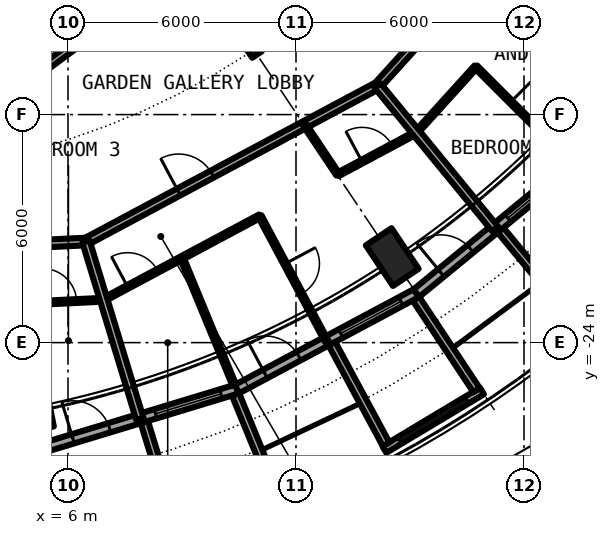
"""IFC4 building model, lengths in metres.
Left out: names, types, materials, properties, quantities, classifications, styles, units other than length and angle.
Written with IfcOpenShell. Run it as: python <this file> out.ifc"""

import sys

from ifc_helpers import new_model, si_unit, direction, frame, frame_2d, origin, origin_2d, place, context, subcontext, project, spatial, rectangle, circle, hollow_circle, i_section, extrude, element, fill, save


model = new_model("IFC4")
c1 = context("Model", 3, precision=1e-05, world=origin(), true_north=direction((0.0, 1.0)))
c2 = subcontext(c1, "Body", "Model", "MODEL_VIEW")
j1 = project(units=[si_unit("LENGTHUNIT", "METRE"), si_unit("PLANEANGLEUNIT", "RADIAN")], contexts=[c1])
p1 = place(None, origin())
s1 = spatial("IfcSite", under=j1, at=p1, CompositionType="ELEMENT")
p2 = place(p1, origin())
s2 = spatial("IfcBuilding", under=s1, at=p2, CompositionType="ELEMENT")
p3 = place(p2, frame((0.0, 0.0, 234.05)))
s3 = spatial("IfcBuildingStorey", under=s2, at=p3, CompositionType="ELEMENT", Elevation=234.05)
p4 = place(p3, frame((5.229, -26.285, 0.0), z_axis=(-0.081382632414, 0.409131968018, 0.908838764516), x_axis=(-0.980784718923, -0.195093144748, 0.0)))
e1 = element("IfcColumn", 1, at=p4, inside=s3, PredefinedType="COLUMN", context=c2, shape_type="SweptSolid", body=[
    extrude(hollow_circle(Radius=0.406, WallThickness=0.03, at=origin_2d()), origin(), (0.0, 0.0, 1.0), 3.081),
])
p5 = place(p3, frame((14.889, -22.283, 0.0), z_axis=(-0.231777820067, 0.346913947437, 0.908806775502), x_axis=(-0.831494710184, -0.555532669549, 0.0)))
e2 = element("IfcColumn", 2, at=p5, inside=s3, PredefinedType="COLUMN", context=c2, shape_type="SweptSolid", body=[
    extrude(hollow_circle(Radius=0.406, WallThickness=0.03, at=origin_2d()), origin(), (0.0, 0.0, 1.0), 3.081),
])
p6 = place(p3, frame((10.889, -16.297, 0.0), z_axis=(0.0, 0.0, 1.0), x_axis=(0.55557023302, -0.831469612303, 0.0)))
e3 = element("IfcColumn", 3, at=p6, inside=s3, PredefinedType="COLUMN", context=c2, shape_type="SweptSolid", body=[
    extrude(i_section(OverallWidth=0.3, OverallDepth=0.3, WebThickness=0.011, FlangeThickness=0.019, FilletRadius=0.027, at=origin_2d()), origin(), (0.0, 0.0, 1.0), 3.05),
])
p7 = place(p3, frame((5.261, -26.907, -0.03), z_axis=(0.0, 0.0, 1.0), x_axis=(0.191440729923, -0.981504175705, 0.0)))
e4 = element("IfcWall", 4, at=p7, inside=s3, PredefinedType="SOLIDWALL", context=c2, shape_type="SweptSolid", body=[
    extrude(rectangle(XDim=2.883, YDim=0.2, at=frame_2d((1.442, 0.0))), origin(), (0.0, 0.0, 1.0), 2.73),
])
p8 = place(p3, frame((5.326, -26.775, 0.0), z_axis=(0.0, 0.0, 1.0), x_axis=(0.956965678721, 0.290201119486, 0.0)))
e5 = element("IfcWall", 5, at=p8, inside=s3, PredefinedType="SOLIDWALL", context=c2, shape_type="SweptSolid", body=[
    extrude(rectangle(XDim=5.351, YDim=0.25, at=frame_2d((2.676, 0.0))), origin(), (0.0, 0.0, 1.0), 2.7),
])
p9 = place(p8, frame((0.841, 0.0, 0.0)))
e6 = element("IfcOpeningElement", 6, at=p9, cuts=e5, PredefinedType="OPENING", context=c2, shape_type="SweptSolid", body=[
    extrude(rectangle(XDim=1.0, YDim=2.2, at=frame_2d((0.5, 1.1))), frame((0.0, 0.135, 0.0), z_axis=(0.0, -1.0, 0.0), x_axis=(1.0, 0.0, 0.0)), (0.0, 0.0, 1.0), 0.27),
])
p10 = place(p8, frame((3.111, 0.0, 0.3)))
e7 = element("IfcOpeningElement", 7, at=p10, cuts=e5, PredefinedType="OPENING", context=c2, shape_type="SweptSolid", body=[
    extrude(rectangle(XDim=1.8, YDim=2.1, at=frame_2d((0.9, 1.05))), frame((0.0, 0.135, 0.0), z_axis=(0.0, -1.0, 0.0), x_axis=(1.0, 0.0, 0.0)), (0.0, 0.0, 1.0), 0.27),
])
p11 = place(p3, frame((8.009, -26.092, -0.03), z_axis=(0.0, 0.0, 1.0), x_axis=(0.293406695073, -0.955987715029, 0.0)))
e8 = element("IfcWall", 8, at=p11, inside=s3, PredefinedType="SOLIDWALL", context=c2, shape_type="SweptSolid", body=[
    extrude(rectangle(XDim=3.006, YDim=0.2, at=frame_2d((1.503, 0.0))), origin(), (0.0, 0.0, 1.0), 2.73),
])
p12 = place(p3, frame((10.409, -25.364, -0.03), z_axis=(0.0, 0.0, 1.0), x_axis=(0.379509886562, -0.925187681501, 0.0)))
e9 = element("IfcWall", 9, at=p12, inside=s3, PredefinedType="SOLIDWALL", context=c2, shape_type="SweptSolid", body=[
    extrude(rectangle(XDim=2.883, YDim=0.2, at=frame_2d((1.441, 0.0))), origin(), (0.0, 0.0, 1.0), 2.73),
])
p13 = place(p3, frame((10.447, -25.222, 0.0), z_axis=(0.0, 0.0, 1.0), x_axis=(0.881915646801, 0.471407246368, 0.0)))
e10 = element("IfcWall", 10, at=p13, inside=s3, PredefinedType="SOLIDWALL", context=c2, shape_type="SweptSolid", body=[
    extrude(rectangle(XDim=5.352, YDim=0.25, at=frame_2d((2.676, 0.0))), origin(), (0.0, 0.0, 1.0), 2.7),
])
p14 = place(p13, frame((0.841, 0.0, 0.0)))
e11 = element("IfcOpeningElement", 11, at=p14, cuts=e10, PredefinedType="OPENING", context=c2, shape_type="SweptSolid", body=[
    extrude(rectangle(XDim=1.0, YDim=2.2, at=frame_2d((0.5, 1.1))), frame((0.0, 0.135, 0.0), z_axis=(0.0, -1.0, 0.0), x_axis=(1.0, 0.0, 0.0)), (0.0, 0.0, 1.0), 0.27),
])
p15 = place(p13, frame((3.096, 0.0, 0.3)))
e12 = element("IfcOpeningElement", 12, at=p15, cuts=e10, PredefinedType="OPENING", context=c2, shape_type="SweptSolid", body=[
    extrude(rectangle(XDim=1.8, YDim=2.1, at=frame_2d((0.9, 1.05))), frame((0.0, 0.135, 0.0), z_axis=(0.0, -1.0, 0.0), x_axis=(1.0, 0.0, 0.0)), (0.0, 0.0, 1.0), 0.27),
])
p16 = place(p3, frame((14.326, -26.813, -0.03), z_axis=(0.0, 0.0, 1.0), x_axis=(0.857672799601, 0.51419584676, 0.0)))
e13 = element("IfcWall", 13, at=p16, inside=s3, PredefinedType="SOLIDWALL", context=c2, shape_type="SweptSolid", body=[
    extrude(rectangle(XDim=2.993, YDim=0.2, at=frame_2d((1.497, 0.0))), origin(), (0.0, 0.0, 1.0), 2.73),
])
p17 = place(p16, frame((0.457, 0.0, 0.33)))
e14 = element("IfcOpeningElement", 14, at=p17, cuts=e13, PredefinedType="OPENING", context=c2, shape_type="SweptSolid", body=[
    extrude(circle(Radius=1.04, at=frame_2d((1.04, 1.04))), frame((0.0, 0.11, 0.0), z_axis=(0.0, -1.0, 0.0), x_axis=(1.0, 0.0, 0.0)), (0.0, 0.0, 1.0), 0.22),
])
p18 = place(p3, frame((12.945, -24.029, -0.03), z_axis=(0.0, 0.0, 1.0), x_axis=(0.474424310775, -0.88029629861, 0.0)))
e15 = element("IfcWall", 15, at=p18, inside=s3, PredefinedType="SOLIDWALL", context=c2, shape_type="SweptSolid", body=[
    extrude(rectangle(XDim=3.006, YDim=0.2, at=frame_2d((1.503, 0.0))), origin(), (0.0, 0.0, 1.0), 2.73),
])
p19 = place(p3, frame((15.157, -22.846, -0.03), z_axis=(0.0, 0.0, 1.0), x_axis=(0.552529231086, -0.833493520548, 0.0)))
e16 = element("IfcWall", 16, at=p19, inside=s3, PredefinedType="SOLIDWALL", context=c2, shape_type="SweptSolid", body=[
    extrude(rectangle(XDim=2.883, YDim=0.2, at=frame_2d((1.441, 0.0))), origin(), (0.0, 0.0, 1.0), 2.73),
])
p20 = place(p3, frame((15.167, -22.699, 0.0), z_axis=(0.0, 0.0, 1.0), x_axis=(0.773019449054, 0.634382322723, 0.0)))
e17 = element("IfcWall", 17, at=p20, inside=s3, PredefinedType="SOLIDWALL", context=c2, shape_type="SweptSolid", body=[
    extrude(rectangle(XDim=5.352, YDim=0.25, at=frame_2d((2.676, 0.0))), origin(), (0.0, 0.0, 1.0), 2.7),
])
p21 = place(p20, frame((0.841, 0.0, 0.0)))
e18 = element("IfcOpeningElement", 18, at=p21, cuts=e17, PredefinedType="OPENING", context=c2, shape_type="SweptSolid", body=[
    extrude(rectangle(XDim=1.0, YDim=2.2, at=frame_2d((0.5, 1.1))), frame((0.0, 0.135, 0.0), z_axis=(0.0, -1.0, 0.0), x_axis=(1.0, 0.0, 0.0)), (0.0, 0.0, 1.0), 0.27),
])
p22 = place(p20, frame((3.111, 0.0, 0.3)))
e19 = element("IfcOpeningElement", 19, at=p22, cuts=e17, PredefinedType="OPENING", context=c2, shape_type="SweptSolid", body=[
    extrude(rectangle(XDim=1.8, YDim=2.1, at=frame_2d((0.9, 1.05))), frame((0.0, 0.135, 0.0), z_axis=(0.0, -1.0, 0.0), x_axis=(1.0, 0.0, 0.0)), (0.0, 0.0, 1.0), 0.27),
])
p23 = place(p3, frame((17.384, -21.041, -0.03), z_axis=(0.0, 0.0, 1.0), x_axis=(0.63709551667, -0.770784861449, 0.0)))
e20 = element("IfcWall", 20, at=p23, inside=s3, PredefinedType="SOLIDWALL", context=c2, shape_type="SweptSolid", body=[
    extrude(rectangle(XDim=3.006, YDim=0.2, at=frame_2d((1.503, 0.0))), origin(), (0.0, 0.0, 1.0), 2.73),
])
p24 = place(p3, frame((15.162, -18.475, 0.0), z_axis=(0.0, 0.0, 1.0), x_axis=(0.671528384412, 0.740978831634, 0.0)))
e21 = element("IfcWall", 21, at=p24, inside=s3, PredefinedType="PARTITIONING", context=c2, shape_type="SweptSolid", body=[
    extrude(rectangle(XDim=2.338, YDim=0.1, at=frame_2d((1.169, 0.0))), origin(), (0.0, 0.0, 1.0), 2.7),
])
p25 = place(p3, frame((6.938, -22.871, 0.0), z_axis=(0.0, 0.0, 1.0), x_axis=(0.881916280728, 0.471406060405, 0.0)))
e22 = element("IfcWall", 22, at=p25, inside=s3, PredefinedType="PARTITIONING", context=c2, shape_type="SweptSolid", body=[
    extrude(rectangle(XDim=4.663, YDim=0.1, at=frame_2d((2.331, 0.0))), origin(), (0.0, 0.0, 1.0), 2.7),
])
p26 = place(p25, frame((0.716, 0.0, 0.0)))
e23 = element("IfcOpeningElement", 23, at=p26, cuts=e22, PredefinedType="OPENING", context=c2, shape_type="SweptSolid", body=[
    extrude(rectangle(XDim=0.9, YDim=2.3, at=frame_2d((0.45, 1.15))), frame((0.0, 0.06, 0.0), z_axis=(0.0, -1.0, 0.0), x_axis=(1.0, 0.0, 0.0)), (0.0, 0.0, 1.0), 0.12),
])
p27 = place(p3, frame((13.106, -19.574, 0.0), z_axis=(0.0, 0.0, 1.0), x_axis=(0.881949682246, 0.471343566824, 0.0)))
e24 = element("IfcWall", 24, at=p27, inside=s3, PredefinedType="PARTITIONING", context=c2, shape_type="SweptSolid", body=[
    extrude(rectangle(XDim=2.331, YDim=0.1, at=frame_2d((1.166, 0.0))), origin(), (0.0, 0.0, 1.0), 2.7),
])
p28 = place(p27, frame((0.716, 0.0, 0.0)))
e25 = element("IfcOpeningElement", 25, at=p28, cuts=e24, PredefinedType="OPENING", context=c2, shape_type="SweptSolid", body=[
    extrude(rectangle(XDim=0.9, YDim=2.3, at=frame_2d((0.45, 1.15))), frame((0.0, 0.06, 0.0), z_axis=(0.0, -1.0, 0.0), x_axis=(1.0, 0.0, 0.0)), (0.0, 0.0, 1.0), 0.12),
])
p29 = place(p3, frame((-0.022, -23.213, 0.0), z_axis=(0.0, 0.0, 1.0), x_axis=(0.998796328708, 0.049049910909, 0.0)))
e26 = element("IfcWall", 26, at=p29, inside=s3, PredefinedType="PARTITIONING", context=c2, shape_type="SweptSolid", body=[
    extrude(rectangle(XDim=6.968, YDim=0.1, at=frame_2d((3.484, 0.0))), origin(), (0.0, 0.0, 1.0), 2.7),
])
p30 = place(p29, frame((3.034, 0.0, 0.0)))
e27 = element("IfcOpeningElement", 27, at=p30, cuts=e26, PredefinedType="OPENING", context=c2, shape_type="SweptSolid", body=[
    extrude(rectangle(XDim=0.9, YDim=2.3, at=frame_2d((0.45, 1.15))), frame((0.0, 0.06, 0.0), z_axis=(0.0, -1.0, 0.0), x_axis=(1.0, 0.0, 0.0)), (0.0, 0.0, 1.0), 0.12),
])
p31 = place(p29, frame((5.357, 0.0, 0.0)))
e28 = element("IfcOpeningElement", 28, at=p31, cuts=e26, PredefinedType="OPENING", context=c2, shape_type="SweptSolid", body=[
    extrude(rectangle(XDim=0.9, YDim=2.3, at=frame_2d((0.45, 1.15))), frame((0.0, 0.06, 0.0), z_axis=(0.0, -1.0, 0.0), x_axis=(1.0, 0.0, 0.0)), (0.0, 0.0, 1.0), 0.12),
])
p32 = place(p3, frame((14.147, -17.238, 0.0), z_axis=(0.0, 0.0, 1.0), x_axis=(0.671561669125, 0.740948665268, 0.0)))
e29 = element("IfcWall", 29, at=p32, inside=s3, PredefinedType="PARTITIONING", context=c2, shape_type="SweptSolid", body=[
    extrude(rectangle(XDim=6.544, YDim=0.2, at=frame_2d((3.272, 0.0))), origin(), (0.0, 0.0, 1.0), 2.7),
])
p33 = place(p32, frame((1.682, 0.0, 0.0)))
e30 = element("IfcOpeningElement", 30, at=p33, cuts=e29, PredefinedType="OPENING", context=c2, shape_type="SweptSolid", body=[
    extrude(rectangle(XDim=1.0, YDim=2.3, at=frame_2d((0.5, 1.15))), frame((0.0, 0.11, 0.0), z_axis=(0.0, -1.0, 0.0), x_axis=(1.0, 0.0, 0.0)), (0.0, 0.0, 1.0), 0.22),
])
p34 = place(p3, frame((6.48, -21.339, 0.0), z_axis=(0.0, 0.0, 1.0), x_axis=(0.881794682218, 0.471633478892, 0.0)))
e31 = element("IfcWall", 31, at=p34, inside=s3, PredefinedType="PARTITIONING", context=c2, shape_type="SweptSolid", body=[
    extrude(rectangle(XDim=8.702, YDim=0.2, at=frame_2d((4.351, 0.0))), origin(), (0.0, 0.0, 1.0), 2.7),
])
p35 = place(p34, frame((2.758, 0.0, 0.0)))
e32 = element("IfcOpeningElement", 32, at=p35, cuts=e31, PredefinedType="OPENING", context=c2, shape_type="SweptSolid", body=[
    extrude(rectangle(XDim=1.0, YDim=2.3, at=frame_2d((0.5, 1.15))), frame((0.0, 0.11, 0.0), z_axis=(0.0, -1.0, 0.0), x_axis=(1.0, 0.0, 0.0)), (0.0, 0.0, 1.0), 0.22),
])
p36 = place(p3, frame((-4.358, -21.872, 0.0), z_axis=(0.0, 0.0, 1.0), x_axis=(0.998795913445, 0.049058366102, 0.0)))
e33 = element("IfcWall", 33, at=p36, inside=s3, PredefinedType="PARTITIONING", context=c2, shape_type="SweptSolid", body=[
    extrude(rectangle(XDim=10.844, YDim=0.2, at=frame_2d((5.422, 0.0))), origin(), (0.0, 0.0, 1.0), 2.7),
])
p37 = place(p36, frame((6.009, 0.0, 0.0)))
e34 = element("IfcOpeningElement", 34, at=p37, cuts=e33, PredefinedType="OPENING", context=c2, shape_type="SweptSolid", body=[
    extrude(rectangle(XDim=1.0, YDim=2.3, at=frame_2d((0.5, 1.15))), frame((0.0, 0.11, 0.0), z_axis=(0.0, -1.0, 0.0), x_axis=(1.0, 0.0, 0.0)), (0.0, 0.0, 1.0), 0.22),
])
p38 = place(p3, frame((5.137, -16.938, 0.0), z_axis=(0.0, 0.0, 1.0), x_axis=(0.803229232922, 0.595670042371, 0.0)))
e35 = element("IfcWall", 35, at=p38, inside=s3, PredefinedType="PARTITIONING", context=c2, shape_type="SweptSolid", body=[
    extrude(rectangle(XDim=10.224, YDim=0.2, at=frame_2d((5.112, 0.0))), origin(), (0.0, 0.0, 1.0), 2.7),
])
p39 = place(p38, frame((4.612, 0.0, 0.0)))
e36 = element("IfcOpeningElement", 36, at=p39, cuts=e35, PredefinedType="OPENING", context=c2, shape_type="SweptSolid", body=[
    extrude(rectangle(XDim=1.0, YDim=2.3, at=frame_2d((0.5, 1.15))), frame((0.0, 0.11, 0.0), z_axis=(0.0, -1.0, 0.0), x_axis=(1.0, 0.0, 0.0)), (0.0, 0.0, 1.0), 0.22),
])
p40 = place(p3, frame((6.473, -21.34, 0.0), z_axis=(0.0, 0.0, 1.0), x_axis=(0.290705166682, -0.956812680761, 0.0)))
e37 = element("IfcWall", 37, at=p40, inside=s3, PredefinedType="PARTITIONING", context=c2, shape_type="SweptSolid", body=[
    extrude(rectangle(XDim=4.874, YDim=0.2, at=frame_2d((2.437, 0.0))), origin(), (0.0, 0.0, 1.0), 2.7),
])
p41 = place(p3, frame((8.994, -21.772, 0.0), z_axis=(0.0, 0.0, 1.0), x_axis=(0.381733837918, -0.924272295911, 0.0)))
e38 = element("IfcWall", 38, at=p41, inside=s3, PredefinedType="PARTITIONING", context=c2, shape_type="SweptSolid", body=[
    extrude(rectangle(XDim=3.618, YDim=0.1, at=frame_2d((1.809, 0.0))), origin(), (0.0, 0.0, 1.0), 2.7),
])
p42 = place(p3, frame((11.049, -20.674, 0.0), z_axis=(0.0, 0.0, 1.0), x_axis=(0.471372010014, -0.881934480659, 0.0)))
e39 = element("IfcWall", 39, at=p42, inside=s3, PredefinedType="PARTITIONING", context=c2, shape_type="SweptSolid", body=[
    extrude(rectangle(XDim=3.734, YDim=0.1, at=frame_2d((1.867, 0.0))), origin(), (0.0, 0.0, 1.0), 2.7),
])
p43 = place(p42, frame((1.417, 0.0, 0.0)))
e40 = element("IfcOpeningElement", 40, at=p43, cuts=e39, PredefinedType="OPENING", context=c2, shape_type="SweptSolid", body=[
    extrude(rectangle(XDim=0.9, YDim=2.3, at=frame_2d((0.45, 1.15))), frame((0.0, 0.06, 0.0), z_axis=(0.0, -1.0, 0.0), x_axis=(1.0, 0.0, 0.0)), (0.0, 0.0, 1.0), 0.12),
])
p44 = place(p3, frame((12.226, -18.266, 0.0), z_axis=(0.0, 0.0, 1.0), x_axis=(0.55634326631, -0.830952567859, 0.0)))
e41 = element("IfcWall", 41, at=p44, inside=s3, PredefinedType="PARTITIONING", context=c2, shape_type="SweptSolid", body=[
    extrude(rectangle(XDim=1.576, YDim=0.1, at=frame_2d((0.788, 0.0))), origin(), (0.0, 0.0, 1.0), 2.7),
])
p45 = place(p3, frame((14.147, -17.238, 0.0), z_axis=(0.0, 0.0, 1.0), x_axis=(0.634374159378, -0.773026148273, 0.0)))
e42 = element("IfcWall", 42, at=p45, inside=s3, PredefinedType="PARTITIONING", context=c2, shape_type="SweptSolid", body=[
    extrude(rectangle(XDim=4.876, YDim=0.2, at=frame_2d((2.438, 0.0))), origin(), (0.0, 0.0, 1.0), 2.7),
])
p46 = place(p3, frame((16.732, -16.743, 0.0), z_axis=(0.0, 0.0, 1.0), x_axis=(0.706967463531, -0.707246071398, 0.0)))
e43 = element("IfcWall", 43, at=p46, inside=s3, PredefinedType="PARTITIONING", context=c2, shape_type="SweptSolid", body=[
    extrude(rectangle(XDim=3.505, YDim=0.1, at=frame_2d((1.752, 0.0))), origin(), (0.0, 0.0, 1.0), 2.7),
])
p47 = place(p46, frame((1.303, 0.0, 0.0)))
e44 = element("IfcOpeningElement", 44, at=p47, cuts=e43, PredefinedType="OPENING", context=c2, shape_type="SweptSolid", body=[
    extrude(rectangle(XDim=0.9, YDim=2.3, at=frame_2d((0.45, 1.15))), frame((0.0, 0.06, 0.0), z_axis=(0.0, -1.0, 0.0), x_axis=(1.0, 0.0, 0.0)), (0.0, 0.0, 1.0), 0.12),
])
p48 = place(p9, origin())
e45 = element("IfcDoor", 45, at=p48, inside=s3, OperationType="SINGLE_SWING_LEFT", PredefinedType="DOOR", context=c2, shape_type="SweptSolid", body=[
    extrude(rectangle(XDim=1.0, YDim=2.2, at=frame_2d((0.5, 1.1))), frame((0.0, 0.025, 0.0), z_axis=(0.0, -1.0, 0.0), x_axis=(1.0, 0.0, 0.0)), (0.0, 0.0, 1.0), 0.05),
])
fill(e6, e45)
p49 = place(p10, origin())
e46 = element("IfcWindow", 46, at=p49, inside=s3, PartitioningType="SINGLE_PANEL", PredefinedType="WINDOW", context=c2, shape_type="SweptSolid", body=[
    extrude(rectangle(XDim=1.8, YDim=2.1, at=frame_2d((0.9, 1.05))), frame((0.0, 0.03, 0.0), z_axis=(0.0, -1.0, 0.0), x_axis=(1.0, 0.0, 0.0)), (0.0, 0.0, 1.0), 0.06),
])
fill(e7, e46)
p50 = place(p14, origin())
e47 = element("IfcDoor", 47, at=p50, inside=s3, OperationType="SINGLE_SWING_LEFT", PredefinedType="DOOR", context=c2, shape_type="SweptSolid", body=[
    extrude(rectangle(XDim=1.0, YDim=2.2, at=frame_2d((0.5, 1.1))), frame((0.0, 0.025, 0.0), z_axis=(0.0, -1.0, 0.0), x_axis=(1.0, 0.0, 0.0)), (0.0, 0.0, 1.0), 0.05),
])
fill(e11, e47)
p51 = place(p15, origin())
e48 = element("IfcWindow", 48, at=p51, inside=s3, PartitioningType="SINGLE_PANEL", PredefinedType="WINDOW", context=c2, shape_type="SweptSolid", body=[
    extrude(rectangle(XDim=1.8, YDim=2.1, at=frame_2d((0.9, 1.05))), frame((0.0, 0.03, 0.0), z_axis=(0.0, -1.0, 0.0), x_axis=(1.0, 0.0, 0.0)), (0.0, 0.0, 1.0), 0.06),
])
fill(e12, e48)
p52 = place(p17, origin())
e49 = element("IfcWindow", 49, at=p52, inside=s3, PartitioningType="SINGLE_PANEL", PredefinedType="WINDOW", context=c2, shape_type="SweptSolid", body=[
    extrude(circle(Radius=1.04, at=frame_2d((1.04, 1.04))), frame((0.0, 0.03, 0.0), z_axis=(0.0, -1.0, 0.0), x_axis=(1.0, 0.0, 0.0)), (0.0, 0.0, 1.0), 0.06),
])
fill(e14, e49)
p53 = place(p21, origin())
e50 = element("IfcDoor", 50, at=p53, inside=s3, OperationType="SINGLE_SWING_LEFT", PredefinedType="DOOR", context=c2, shape_type="SweptSolid", body=[
    extrude(rectangle(XDim=1.0, YDim=2.2, at=frame_2d((0.5, 1.1))), frame((0.0, 0.025, 0.0), z_axis=(0.0, -1.0, 0.0), x_axis=(1.0, 0.0, 0.0)), (0.0, 0.0, 1.0), 0.05),
])
fill(e18, e50)
p54 = place(p22, origin())
e51 = element("IfcWindow", 51, at=p54, inside=s3, PartitioningType="SINGLE_PANEL", PredefinedType="WINDOW", context=c2, shape_type="SweptSolid", body=[
    extrude(rectangle(XDim=1.8, YDim=2.1, at=frame_2d((0.9, 1.05))), frame((0.0, 0.03, 0.0), z_axis=(0.0, -1.0, 0.0), x_axis=(1.0, 0.0, 0.0)), (0.0, 0.0, 1.0), 0.06),
])
fill(e19, e51)
p55 = place(p31, origin())
e52 = element("IfcDoor", 52, at=p55, inside=s3, OperationType="SINGLE_SWING_RIGHT", PredefinedType="DOOR", context=c2, shape_type="SweptSolid", body=[
    extrude(rectangle(XDim=0.9, YDim=2.3, at=frame_2d((0.45, 1.15))), frame((0.0, 0.025, 0.0), z_axis=(0.0, -1.0, 0.0), x_axis=(1.0, 0.0, 0.0)), (0.0, 0.0, 1.0), 0.05),
])
fill(e28, e52)
p56 = place(p35, origin())
e53 = element("IfcDoor", 53, at=p56, inside=s3, OperationType="SINGLE_SWING_LEFT", PredefinedType="DOOR", context=c2, shape_type="SweptSolid", body=[
    extrude(rectangle(XDim=1.0, YDim=2.3, at=frame_2d((0.5, 1.15))), frame((0.0, 0.025, 0.0), z_axis=(0.0, -1.0, 0.0), x_axis=(1.0, 0.0, 0.0)), (0.0, 0.0, 1.0), 0.05),
])
fill(e32, e53)
p57 = place(p28, origin())
e54 = element("IfcDoor", 54, at=p57, inside=s3, OperationType="SINGLE_SWING_LEFT", PredefinedType="DOOR", context=c2, shape_type="SweptSolid", body=[
    extrude(rectangle(XDim=0.9, YDim=2.3, at=frame_2d((0.45, 1.15))), frame((0.0, 0.025, 0.0), z_axis=(0.0, -1.0, 0.0), x_axis=(1.0, 0.0, 0.0)), (0.0, 0.0, 1.0), 0.05),
])
fill(e25, e54)
p58 = place(p43, origin())
e55 = element("IfcDoor", 55, at=p58, inside=s3, OperationType="SINGLE_SWING_LEFT", PredefinedType="DOOR", context=c2, shape_type="SweptSolid", body=[
    extrude(rectangle(XDim=0.9, YDim=2.3, at=frame_2d((0.45, 1.15))), frame((0.0, 0.025, 0.0), z_axis=(0.0, -1.0, 0.0), x_axis=(1.0, 0.0, 0.0)), (0.0, 0.0, 1.0), 0.05),
])
fill(e40, e55)
p59 = place(p26, origin())
e56 = element("IfcDoor", 56, at=p59, inside=s3, OperationType="SINGLE_SWING_LEFT", PredefinedType="DOOR", context=c2, shape_type="SweptSolid", body=[
    extrude(rectangle(XDim=0.9, YDim=2.3, at=frame_2d((0.45, 1.15))), frame((0.0, 0.025, 0.0), z_axis=(0.0, -1.0, 0.0), x_axis=(1.0, 0.0, 0.0)), (0.0, 0.0, 1.0), 0.05),
])
fill(e23, e56)
p60 = place(p47, origin())
e57 = element("IfcDoor", 57, at=p60, inside=s3, OperationType="SINGLE_SWING_LEFT", PredefinedType="DOOR", context=c2, shape_type="SweptSolid", body=[
    extrude(rectangle(XDim=0.9, YDim=2.3, at=frame_2d((0.45, 1.15))), frame((0.0, 0.025, 0.0), z_axis=(0.0, -1.0, 0.0), x_axis=(1.0, 0.0, 0.0)), (0.0, 0.0, 1.0), 0.05),
])
fill(e44, e57)
save(model, sys.argv[1])
